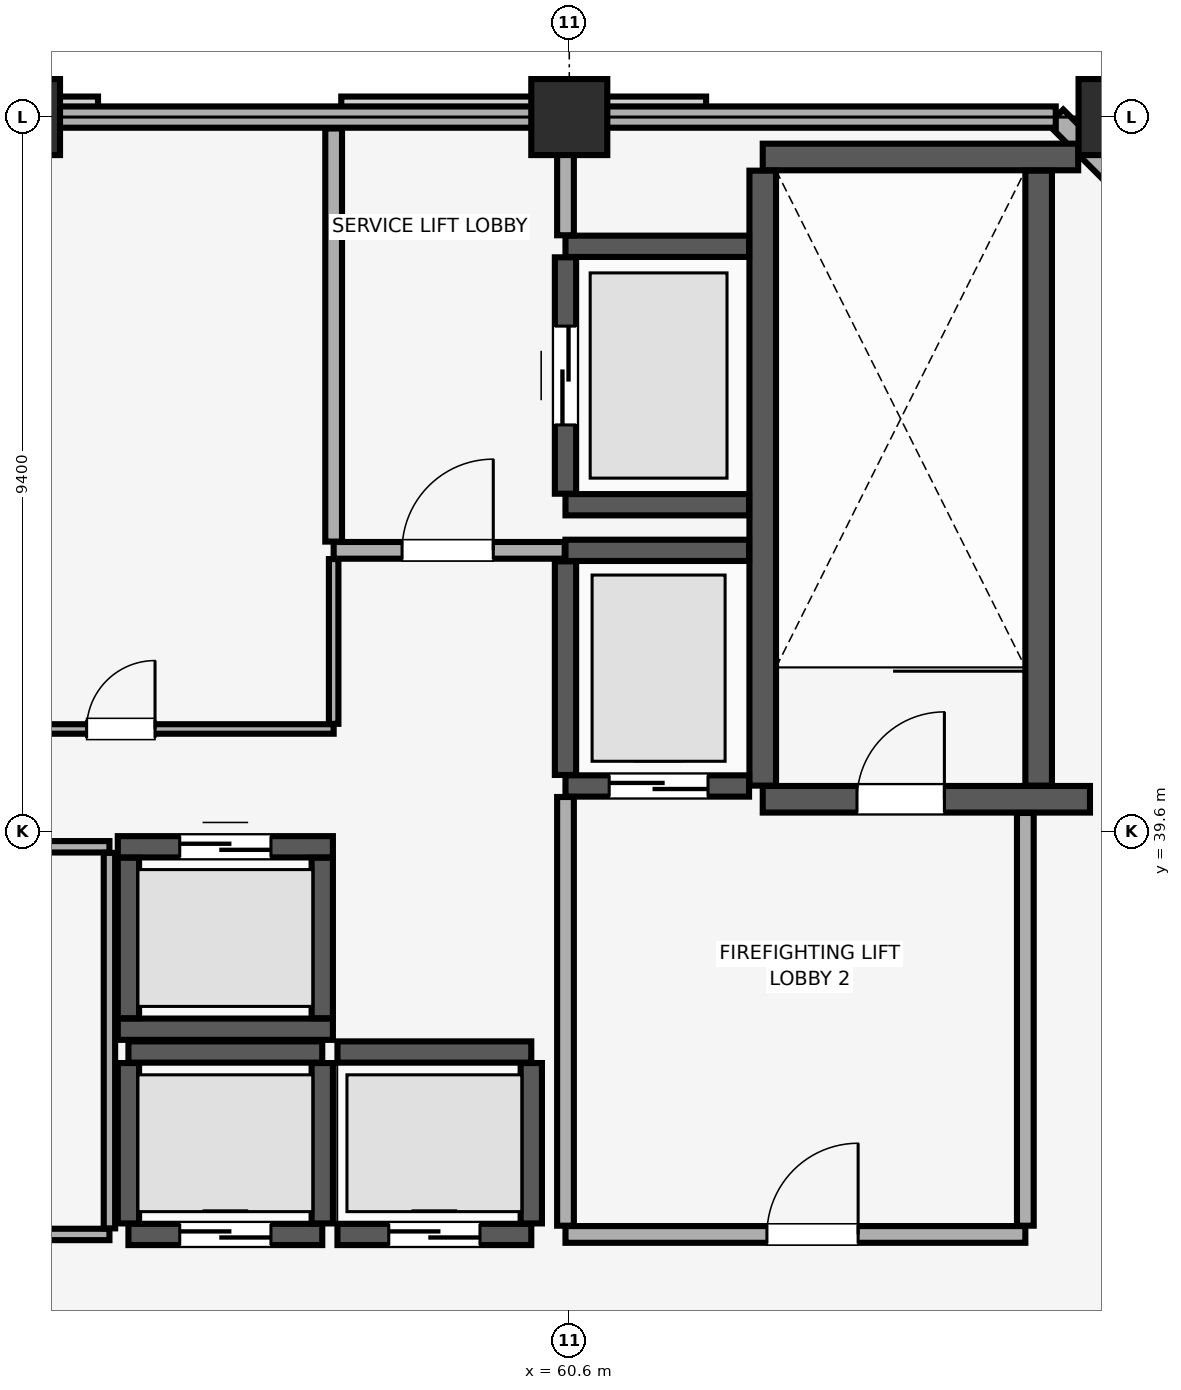
"""IFC4 building model, lengths in metres.
Left out: names, types, materials, properties, quantities, classifications, styles, units other than length and angle.
Written with IfcOpenShell. Run it as: python <this file> out.ifc"""

import sys

from ifc_helpers import new_model, si_unit, direction, frame, frame_2d, origin, origin_2d, place, context, subcontext, project, spatial, rectangle, extrude, element, fill, save


model = new_model("IFC4")
c1 = context("Model", 3, precision=1e-05, world=origin(), true_north=direction((0.0, 1.0)))
c2 = subcontext(c1, "Body", "Model", "MODEL_VIEW")
j1 = project(units=[si_unit("LENGTHUNIT", "METRE"), si_unit("PLANEANGLEUNIT", "RADIAN")], contexts=[c1])
p1 = place(None, origin())
s1 = spatial("IfcSite", under=j1, at=p1, CompositionType="ELEMENT")
p2 = place(p1, origin())
s2 = spatial("IfcBuilding", under=s1, at=p2, CompositionType="ELEMENT")
p3 = place(p2, frame((0.0, 0.0, 310.7)))
s3 = spatial("IfcBuildingStorey", under=s2, at=p3, CompositionType="ELEMENT", Elevation=310.7)
for number, where, z_axis, x_axis in (
    (1, (53.4, 49.0, 0.0), (0.0, 0.0, 1.0), (1.0, 0.0, 0.0)),
    (2, (60.6, 49.0, 0.0), (0.0, 0.0, 1.0), (1.0, 0.0, 0.0)),
    (3, (67.8, 49.0, 0.0), (0.0, 0.0, 1.0), (1.0, 0.0, 0.0)),
):
    element("IfcColumn", number, at=place(p3, frame(where, z_axis=z_axis, x_axis=x_axis)), inside=s3, PredefinedType="COLUMN", context=c2, shape_type="SweptSolid", body=[
        extrude(rectangle(XDim=1.0, YDim=1.0, at=origin_2d()), origin(), (0.0, 0.0, 1.0), 7.5),
    ])
p4 = place(p3, frame((67.8, 48.2, 0.0), z_axis=(0.0, 0.0, 1.0), x_axis=(-0.707106781187, 0.707106781187, 0.0)))
e4 = element("IfcWall", 4, at=p4, inside=s3, PredefinedType="SOLIDWALL", context=c2, shape_type="SweptSolid", body=[
    extrude(rectangle(XDim=1.131, YDim=0.28, at=frame_2d((0.566, 0.0))), origin(), (0.0, 0.0, 1.0), 7.5),
])
p5 = place(p3, frame((67.0, 49.0, 0.0), z_axis=(0.0, 0.0, 1.0), x_axis=(-1.0, 0.0, 0.0)))
e5 = element("IfcWall", 5, at=p5, inside=s3, PredefinedType="SOLIDWALL", context=c2, shape_type="SweptSolid", body=[
    extrude(rectangle(XDim=50.0, YDim=0.28, at=frame_2d((25.0, 0.0))), origin(), (0.0, 0.0, 1.0), 7.0),
])
p6 = place(p3, frame((63.145, 40.025, 0.0), z_axis=(0.0, 0.0, 1.0), x_axis=(1.0, 0.0, 0.0)))
e6 = element("IfcWall", 6, at=p6, inside=s3, PredefinedType="SHEAR", context=c2, shape_type="SweptSolid", body=[
    extrude(rectangle(XDim=4.305, YDim=0.35, at=frame_2d((2.152, 0.0))), origin(), (0.0, 0.0, 1.0), 7.5),
])
p7 = place(p6, frame((1.24, 0.0, 0.0)))
e7 = element("IfcOpeningElement", 7, at=p7, cuts=e6, PredefinedType="OPENING", context=c2, shape_type="SweptSolid", body=[
    extrude(rectangle(XDim=1.15, YDim=2.15, at=frame_2d((0.575, 1.075))), frame((0.0, 0.185, 0.0), z_axis=(0.0, -1.0, 0.0), x_axis=(1.0, 0.0, 0.0)), (0.0, 0.0, 1.0), 0.37),
])
p8 = place(p3, frame((63.145, 48.475, 0.0), z_axis=(0.0, 0.0, 1.0), x_axis=(1.0, 0.0, 0.0)))
e8 = element("IfcWall", 8, at=p8, inside=s3, PredefinedType="SHEAR", context=c2, shape_type="SweptSolid", body=[
    extrude(rectangle(XDim=4.15, YDim=0.35, at=frame_2d((2.075, 0.0))), origin(), (0.0, 0.0, 1.0), 7.5),
])
for number, where, z_axis, x_axis in (
    (9, (63.145, 40.205, 0.0), (0.0, 0.0, 1.0), (0.0, 1.0, 0.0)),
    (10, (66.775, 40.205, 0.0), (0.0, 0.0, 1.0), (0.0, 1.0, 0.0)),
):
    element("IfcWall", number, at=place(p3, frame(where, z_axis=z_axis, x_axis=x_axis)), inside=s3, PredefinedType="SHEAR", context=c2, shape_type="SweptSolid", body=[
        extrude(rectangle(XDim=8.09, YDim=0.35, at=frame_2d((4.045, 0.0))), origin(), (0.0, 0.0, 1.0), 7.5),
    ])
p9 = place(p3, frame((54.8, 34.3, 0.0), z_axis=(0.0, 0.0, 1.0), x_axis=(1.0, 0.0, 0.0)))
e11 = element("IfcWall", 11, at=p9, inside=s3, PredefinedType="SHEAR", context=c2, shape_type="SweptSolid", body=[
    extrude(rectangle(XDim=2.55, YDim=0.28, at=frame_2d((1.275, 0.0))), origin(), (0.0, 0.0, 1.0), 7.5),
])
p10 = place(p9, frame((0.675, 0.0, 0.0)))
e12 = element("IfcOpeningElement", 12, at=p10, cuts=e11, PredefinedType="OPENING", context=c2, shape_type="SweptSolid", body=[
    extrude(rectangle(XDim=1.2, YDim=2.25, at=frame_2d((0.6, 1.125))), frame((0.0, 0.15, 0.0), z_axis=(0.0, -1.0, 0.0), x_axis=(1.0, 0.0, 0.0)), (0.0, 0.0, 1.0), 0.3),
])
p11 = place(p3, frame((54.8, 36.7, 0.0), z_axis=(0.0, 0.0, 1.0), x_axis=(1.0, 0.0, 0.0)))
e13 = element("IfcWall", 13, at=p11, inside=s3, PredefinedType="SHEAR", context=c2, shape_type="SweptSolid", body=[
    extrude(rectangle(XDim=2.55, YDim=0.28, at=frame_2d((1.275, 0.0))), origin(), (0.0, 0.0, 1.0), 7.5),
])
for number, where, z_axis, x_axis in (
    (14, (54.8, 34.445, 0.0), (0.0, 0.0, 1.0), (0.0, 1.0, 0.0)),
    (15, (57.35, 34.445, 0.0), (0.0, 0.0, 1.0), (0.0, 1.0, 0.0)),
):
    element("IfcWall", number, at=place(p3, frame(where, z_axis=z_axis, x_axis=x_axis)), inside=s3, PredefinedType="SHEAR", context=c2, shape_type="SweptSolid", body=[
        extrude(rectangle(XDim=2.11, YDim=0.28, at=frame_2d((1.055, 0.0))), origin(), (0.0, 0.0, 1.0), 7.5),
    ])
p12 = place(p3, frame((57.55, 34.3, 0.0), z_axis=(0.0, 0.0, 1.0), x_axis=(1.0, 0.0, 0.0)))
e16 = element("IfcWall", 16, at=p12, inside=s3, PredefinedType="SHEAR", context=c2, shape_type="SweptSolid", body=[
    extrude(rectangle(XDim=2.55, YDim=0.28, at=frame_2d((1.275, 0.0))), origin(), (0.0, 0.0, 1.0), 7.5),
])
p13 = place(p12, frame((0.675, 0.0, 0.0)))
e17 = element("IfcOpeningElement", 17, at=p13, cuts=e16, PredefinedType="OPENING", context=c2, shape_type="SweptSolid", body=[
    extrude(rectangle(XDim=1.2, YDim=2.25, at=frame_2d((0.6, 1.125))), frame((0.0, 0.15, 0.0), z_axis=(0.0, -1.0, 0.0), x_axis=(1.0, 0.0, 0.0)), (0.0, 0.0, 1.0), 0.3),
])
p14 = place(p3, frame((57.55, 36.7, 0.0), z_axis=(0.0, 0.0, 1.0), x_axis=(1.0, 0.0, 0.0)))
e18 = element("IfcWall", 18, at=p14, inside=s3, PredefinedType="SHEAR", context=c2, shape_type="SweptSolid", body=[
    extrude(rectangle(XDim=2.55, YDim=0.28, at=frame_2d((1.275, 0.0))), origin(), (0.0, 0.0, 1.0), 7.5),
])
p15 = place(p3, frame((60.1, 34.445, 0.0), z_axis=(0.0, 0.0, 1.0), x_axis=(0.0, 1.0, 0.0)))
e19 = element("IfcWall", 19, at=p15, inside=s3, PredefinedType="SHEAR", context=c2, shape_type="SweptSolid", body=[
    extrude(rectangle(XDim=2.11, YDim=0.28, at=frame_2d((1.055, 0.0))), origin(), (0.0, 0.0, 1.0), 7.5),
])
p16 = place(p3, frame((54.66, 37.0, 0.0), z_axis=(0.0, 0.0, 1.0), x_axis=(1.0, 0.0, 0.0)))
e20 = element("IfcWall", 20, at=p16, inside=s3, PredefinedType="SHEAR", context=c2, shape_type="SweptSolid", body=[
    extrude(rectangle(XDim=2.83, YDim=0.28, at=frame_2d((1.415, 0.0))), origin(), (0.0, 0.0, 1.0), 7.5),
])
p17 = place(p3, frame((54.66, 39.4, 0.0), z_axis=(0.0, 0.0, 1.0), x_axis=(1.0, 0.0, 0.0)))
e21 = element("IfcWall", 21, at=p17, inside=s3, PredefinedType="SHEAR", context=c2, shape_type="SweptSolid", body=[
    extrude(rectangle(XDim=2.83, YDim=0.28, at=frame_2d((1.415, 0.0))), origin(), (0.0, 0.0, 1.0), 7.5),
])
p18 = place(p17, frame((0.815, 0.0, 0.0)))
e22 = element("IfcOpeningElement", 22, at=p18, cuts=e21, PredefinedType="OPENING", context=c2, shape_type="SweptSolid", body=[
    extrude(rectangle(XDim=1.2, YDim=2.25, at=frame_2d((0.6, 1.125))), frame((0.0, 0.15, 0.0), z_axis=(0.0, -1.0, 0.0), x_axis=(1.0, 0.0, 0.0)), (0.0, 0.0, 1.0), 0.3),
])
for number, where, z_axis, x_axis in (
    (23, (54.8, 37.145, 0.0), (0.0, 0.0, 1.0), (0.0, 1.0, 0.0)),
    (24, (57.35, 37.145, 0.0), (0.0, 0.0, 1.0), (0.0, 1.0, 0.0)),
):
    element("IfcWall", number, at=place(p3, frame(where, z_axis=z_axis, x_axis=x_axis)), inside=s3, PredefinedType="SHEAR", context=c2, shape_type="SweptSolid", body=[
        extrude(rectangle(XDim=2.11, YDim=0.28, at=frame_2d((1.055, 0.0))), origin(), (0.0, 0.0, 1.0), 7.5),
    ])
p19 = place(p3, frame((60.55, 40.2, 0.0), z_axis=(0.0, 0.0, 1.0), x_axis=(1.0, 0.0, 0.0)))
e25 = element("IfcWall", 25, at=p19, inside=s3, PredefinedType="SHEAR", context=c2, shape_type="SweptSolid", body=[
    extrude(rectangle(XDim=2.415, YDim=0.28, at=frame_2d((1.208, 0.0))), origin(), (0.0, 0.0, 1.0), 7.5),
])
p20 = place(p19, frame((0.575, 0.0, 0.0)))
e26 = element("IfcOpeningElement", 26, at=p20, cuts=e25, PredefinedType="OPENING", context=c2, shape_type="SweptSolid", body=[
    extrude(rectangle(XDim=1.3, YDim=2.3, at=frame_2d((0.65, 1.15))), frame((0.0, 0.15, 0.0), z_axis=(0.0, -1.0, 0.0), x_axis=(1.0, 0.0, 0.0)), (0.0, 0.0, 1.0), 0.3),
])
p21 = place(p3, frame((60.55, 43.3, 0.0), z_axis=(0.0, 0.0, 1.0), x_axis=(1.0, 0.0, 0.0)))
e27 = element("IfcWall", 27, at=p21, inside=s3, PredefinedType="SHEAR", context=c2, shape_type="SweptSolid", body=[
    extrude(rectangle(XDim=2.415, YDim=0.28, at=frame_2d((1.208, 0.0))), origin(), (0.0, 0.0, 1.0), 7.5),
])
p22 = place(p3, frame((60.55, 40.345, 0.0), z_axis=(0.0, 0.0, 1.0), x_axis=(0.0, 1.0, 0.0)))
e28 = element("IfcWall", 28, at=p22, inside=s3, PredefinedType="SHEAR", context=c2, shape_type="SweptSolid", body=[
    extrude(rectangle(XDim=2.81, YDim=0.28, at=frame_2d((1.405, 0.0))), origin(), (0.0, 0.0, 1.0), 7.5),
])
for number, where, z_axis, x_axis in (
    (29, (60.55, 43.9, 0.0), (0.0, 0.0, 1.0), (1.0, 0.0, 0.0)),
    (30, (60.55, 47.3, 0.0), (0.0, 0.0, 1.0), (1.0, 0.0, 0.0)),
):
    element("IfcWall", number, at=place(p3, frame(where, z_axis=z_axis, x_axis=x_axis)), inside=s3, PredefinedType="SHEAR", context=c2, shape_type="SweptSolid", body=[
        extrude(rectangle(XDim=2.415, YDim=0.28, at=frame_2d((1.208, 0.0))), origin(), (0.0, 0.0, 1.0), 7.5),
    ])
p23 = place(p3, frame((60.55, 44.045, 0.0), z_axis=(0.0, 0.0, 1.0), x_axis=(0.0, 1.0, 0.0)))
e31 = element("IfcWall", 31, at=p23, inside=s3, PredefinedType="SHEAR", context=c2, shape_type="SweptSolid", body=[
    extrude(rectangle(XDim=3.11, YDim=0.28, at=frame_2d((1.555, 0.0))), origin(), (0.0, 0.0, 1.0), 7.5),
])
p24 = place(p23, frame((0.905, 0.0, 0.0)))
e32 = element("IfcOpeningElement", 32, at=p24, cuts=e31, PredefinedType="OPENING", context=c2, shape_type="SweptSolid", body=[
    extrude(rectangle(XDim=1.3, YDim=2.3, at=frame_2d((0.65, 1.15))), frame((0.0, 0.15, 0.0), z_axis=(0.0, -1.0, 0.0), x_axis=(1.0, 0.0, 0.0)), (0.0, 0.0, 1.0), 0.3),
])
p25 = place(p3, frame((60.55, 34.3, 0.0), z_axis=(0.0, 0.0, 1.0), x_axis=(1.0, 0.0, 0.0)))
e33 = element("IfcWall", 33, at=p25, inside=s3, PredefinedType="PARTITIONING", context=c2, shape_type="SweptSolid", body=[
    extrude(rectangle(XDim=6.05, YDim=0.22, at=frame_2d((3.025, 0.0))), origin(), (0.0, 0.0, 1.0), 7.5),
])
p26 = place(p25, frame((2.65, 0.0, 0.0)))
e34 = element("IfcOpeningElement", 34, at=p26, cuts=e33, PredefinedType="OPENING", context=c2, shape_type="SweptSolid", body=[
    extrude(rectangle(XDim=1.2, YDim=2.15, at=frame_2d((0.6, 1.075))), frame((0.0, 0.12, 0.0), z_axis=(0.0, -1.0, 0.0), x_axis=(1.0, 0.0, 0.0)), (0.0, 0.0, 1.0), 0.24),
])
p27 = place(p3, frame((60.55, 34.415, 0.0), z_axis=(0.0, 0.0, 1.0), x_axis=(0.0, 1.0, 0.0)))
e35 = element("IfcWall", 35, at=p27, inside=s3, PredefinedType="PARTITIONING", context=c2, shape_type="SweptSolid", body=[
    extrude(rectangle(XDim=5.64, YDim=0.22, at=frame_2d((2.82, 0.0))), origin(), (0.0, 0.0, 1.0), 7.5),
])
p28 = place(p3, frame((66.6, 34.415, 0.0), z_axis=(0.0, 0.0, 1.0), x_axis=(0.0, 1.0, 0.0)))
e36 = element("IfcWall", 36, at=p28, inside=s3, PredefinedType="PARTITIONING", context=c2, shape_type="SweptSolid", body=[
    extrude(rectangle(XDim=5.43, YDim=0.22, at=frame_2d((2.715, 0.0))), origin(), (0.0, 0.0, 1.0), 7.5),
])
p29 = place(p3, frame((57.5, 43.3, 0.0), z_axis=(0.0, 0.0, 1.0), x_axis=(1.0, 0.0, 0.0)))
e37 = element("IfcWall", 37, at=p29, inside=s3, PredefinedType="PARTITIONING", context=c2, shape_type="SweptSolid", body=[
    extrude(rectangle(XDim=3.04, YDim=0.22, at=frame_2d((1.52, 0.0))), origin(), (0.0, 0.0, 1.0), 7.5),
])
p30 = place(p29, frame((0.9, 0.0, 0.0)))
e38 = element("IfcOpeningElement", 38, at=p30, cuts=e37, PredefinedType="OPENING", context=c2, shape_type="SweptSolid", body=[
    extrude(rectangle(XDim=1.2, YDim=2.15, at=frame_2d((0.6, 1.075))), frame((0.0, 0.12, 0.0), z_axis=(0.0, -1.0, 0.0), x_axis=(1.0, 0.0, 0.0)), (0.0, 0.0, 1.0), 0.24),
])
p31 = place(p3, frame((57.5, 43.415, 0.0), z_axis=(0.0, 0.0, 1.0), x_axis=(0.0, 1.0, 0.0)))
e39 = element("IfcWall", 39, at=p31, inside=s3, PredefinedType="PARTITIONING", context=c2, shape_type="SweptSolid", body=[
    extrude(rectangle(XDim=5.435, YDim=0.22, at=frame_2d((2.718, 0.0))), origin(), (0.0, 0.0, 1.0), 7.5),
])
p32 = place(p3, frame((60.55, 47.445, 0.0), z_axis=(0.0, 0.0, 1.0), x_axis=(0.0, 1.0, 0.0)))
e40 = element("IfcWall", 40, at=p32, inside=s3, PredefinedType="PARTITIONING", context=c2, shape_type="SweptSolid", body=[
    extrude(rectangle(XDim=1.405, YDim=0.22, at=frame_2d((0.703, 0.0))), origin(), (0.0, 0.0, 1.0), 7.5),
])
p33 = place(p3, frame((46.6, 34.3, 0.0), z_axis=(0.0, 0.0, 1.0), x_axis=(1.0, 0.0, 0.0)))
e41 = element("IfcWall", 41, at=p33, inside=s3, PredefinedType="PARTITIONING", context=c2, shape_type="SweptSolid", body=[
    extrude(rectangle(XDim=7.95, YDim=0.15, at=frame_2d((3.975, 0.0))), origin(), (0.0, 0.0, 1.0), 7.5),
])
p34 = place(p33, frame((3.4, 0.0, 0.0)))
e42 = element("IfcOpeningElement", 42, at=p34, cuts=e41, PredefinedType="OPENING", context=c2, shape_type="SweptSolid", body=[
    extrude(rectangle(XDim=1.0, YDim=2.15, at=frame_2d((0.5, 1.075))), frame((0.0, 0.085, 0.0), z_axis=(0.0, -1.0, 0.0), x_axis=(1.0, 0.0, 0.0)), (0.0, 0.0, 1.0), 0.17),
])
p35 = place(p3, frame((46.6, 39.4, 0.0), z_axis=(0.0, 0.0, 1.0), x_axis=(1.0, 0.0, 0.0)))
e43 = element("IfcWall", 43, at=p35, inside=s3, PredefinedType="PARTITIONING", context=c2, shape_type="SweptSolid", body=[
    extrude(rectangle(XDim=7.95, YDim=0.15, at=frame_2d((3.975, 0.0))), origin(), (0.0, 0.0, 1.0), 7.5),
])
p36 = place(p3, frame((54.55, 34.38, 0.0), z_axis=(0.0, 0.0, 1.0), x_axis=(0.0, 1.0, 0.0)))
e44 = element("IfcWall", 44, at=p36, inside=s3, PredefinedType="PARTITIONING", context=c2, shape_type="SweptSolid", body=[
    extrude(rectangle(XDim=4.94, YDim=0.15, at=frame_2d((2.47, 0.0))), origin(), (0.0, 0.0, 1.0), 7.5),
])
p37 = place(p3, frame((49.468, 40.95, 0.0), z_axis=(0.0, 0.0, 1.0), x_axis=(1.0, 0.0, 0.0)))
e45 = element("IfcWall", 45, at=p37, inside=s3, PredefinedType="PARTITIONING", context=c2, shape_type="SweptSolid", body=[
    extrude(rectangle(XDim=8.032, YDim=0.125, at=frame_2d((4.016, 0.0))), origin(), (0.0, 0.0, 1.0), 7.5),
])
p38 = place(p37, frame((4.782, 0.0, 0.0)))
e46 = element("IfcOpeningElement", 46, at=p38, cuts=e45, PredefinedType="OPENING", context=c2, shape_type="SweptSolid", body=[
    extrude(rectangle(XDim=0.9, YDim=2.1, at=frame_2d((0.45, 1.05))), frame((0.0, 0.073, 0.0), z_axis=(0.0, -1.0, 0.0), x_axis=(1.0, 0.0, 0.0)), (0.0, 0.0, 1.0), 0.145),
])
p39 = place(p3, frame((57.5, 41.018, 0.0), z_axis=(0.0, 0.0, 1.0), x_axis=(0.0, 1.0, 0.0)))
e47 = element("IfcWall", 47, at=p39, inside=s3, PredefinedType="PARTITIONING", context=c2, shape_type="SweptSolid", body=[
    extrude(rectangle(XDim=2.167, YDim=0.125, at=frame_2d((1.084, 0.0))), origin(), (0.0, 0.0, 1.0), 7.5),
])
p40 = place(p7, origin())
e48 = element("IfcDoor", 48, at=p40, inside=s3, OperationType="SINGLE_SWING_RIGHT", PredefinedType="DOOR", context=c2, shape_type="SweptSolid", body=[
    extrude(rectangle(XDim=1.15, YDim=2.15, at=frame_2d((0.575, 1.075))), frame((0.0, 0.025, 0.0), z_axis=(0.0, -1.0, 0.0), x_axis=(1.0, 0.0, 0.0)), (0.0, 0.0, 1.0), 0.05),
])
fill(e7, e48)
p41 = place(p10, origin())
e49 = element("IfcDoor", 49, at=p41, inside=s3, OperationType="DOUBLE_DOOR_SLIDING", PredefinedType="DOOR", context=c2, shape_type="SweptSolid", body=[
    extrude(rectangle(XDim=1.2, YDim=2.25, at=frame_2d((0.6, 1.125))), frame((0.0, 0.025, 0.0), z_axis=(0.0, -1.0, 0.0), x_axis=(1.0, 0.0, 0.0)), (0.0, 0.0, 1.0), 0.05),
])
fill(e12, e49)
p42 = place(p13, origin())
e50 = element("IfcDoor", 50, at=p42, inside=s3, OperationType="DOUBLE_DOOR_SLIDING", PredefinedType="DOOR", context=c2, shape_type="SweptSolid", body=[
    extrude(rectangle(XDim=1.2, YDim=2.25, at=frame_2d((0.6, 1.125))), frame((0.0, 0.025, 0.0), z_axis=(0.0, -1.0, 0.0), x_axis=(1.0, 0.0, 0.0)), (0.0, 0.0, 1.0), 0.05),
])
fill(e17, e50)
p43 = place(p18, origin())
e51 = element("IfcDoor", 51, at=p43, inside=s3, OperationType="DOUBLE_DOOR_SLIDING", PredefinedType="DOOR", context=c2, shape_type="SweptSolid", body=[
    extrude(rectangle(XDim=1.2, YDim=2.25, at=frame_2d((0.6, 1.125))), frame((0.0, 0.025, 0.0), z_axis=(0.0, -1.0, 0.0), x_axis=(1.0, 0.0, 0.0)), (0.0, 0.0, 1.0), 0.05),
])
fill(e22, e51)
p44 = place(p20, origin())
e52 = element("IfcDoor", 52, at=p44, inside=s3, OperationType="DOUBLE_DOOR_SLIDING", PredefinedType="DOOR", context=c2, shape_type="SweptSolid", body=[
    extrude(rectangle(XDim=1.3, YDim=2.3, at=frame_2d((0.65, 1.15))), frame((0.0, 0.025, 0.0), z_axis=(0.0, -1.0, 0.0), x_axis=(1.0, 0.0, 0.0)), (0.0, 0.0, 1.0), 0.05),
])
fill(e26, e52)
p45 = place(p24, origin())
e53 = element("IfcDoor", 53, at=p45, inside=s3, OperationType="DOUBLE_DOOR_SLIDING", PredefinedType="DOOR", context=c2, shape_type="SweptSolid", body=[
    extrude(rectangle(XDim=1.3, YDim=2.3, at=frame_2d((0.65, 1.15))), frame((0.0, 0.025, 0.0), z_axis=(0.0, -1.0, 0.0), x_axis=(1.0, 0.0, 0.0)), (0.0, 0.0, 1.0), 0.05),
])
fill(e32, e53)
p46 = place(p26, origin())
e54 = element("IfcDoor", 54, at=p46, inside=s3, OperationType="SINGLE_SWING_RIGHT", PredefinedType="DOOR", context=c2, shape_type="SweptSolid", body=[
    extrude(rectangle(XDim=1.2, YDim=2.15, at=frame_2d((0.6, 1.075))), frame((0.0, 0.025, 0.0), z_axis=(0.0, -1.0, 0.0), x_axis=(1.0, 0.0, 0.0)), (0.0, 0.0, 1.0), 0.05),
])
fill(e34, e54)
p47 = place(p30, origin())
e55 = element("IfcDoor", 55, at=p47, inside=s3, OperationType="SINGLE_SWING_RIGHT", PredefinedType="DOOR", context=c2, shape_type="SweptSolid", body=[
    extrude(rectangle(XDim=1.2, YDim=2.15, at=frame_2d((0.6, 1.075))), frame((0.0, 0.025, 0.0), z_axis=(0.0, -1.0, 0.0), x_axis=(1.0, 0.0, 0.0)), (0.0, 0.0, 1.0), 0.05),
])
fill(e38, e55)
p48 = place(p38, origin())
e56 = element("IfcDoor", 56, at=p48, inside=s3, OperationType="SINGLE_SWING_RIGHT", PredefinedType="DOOR", context=c2, shape_type="SweptSolid", body=[
    extrude(rectangle(XDim=0.9, YDim=2.1, at=frame_2d((0.45, 1.05))), frame((0.0, 0.025, 0.0), z_axis=(0.0, -1.0, 0.0), x_axis=(1.0, 0.0, 0.0)), (0.0, 0.0, 1.0), 0.05),
])
fill(e46, e56)
save(model, sys.argv[1])
